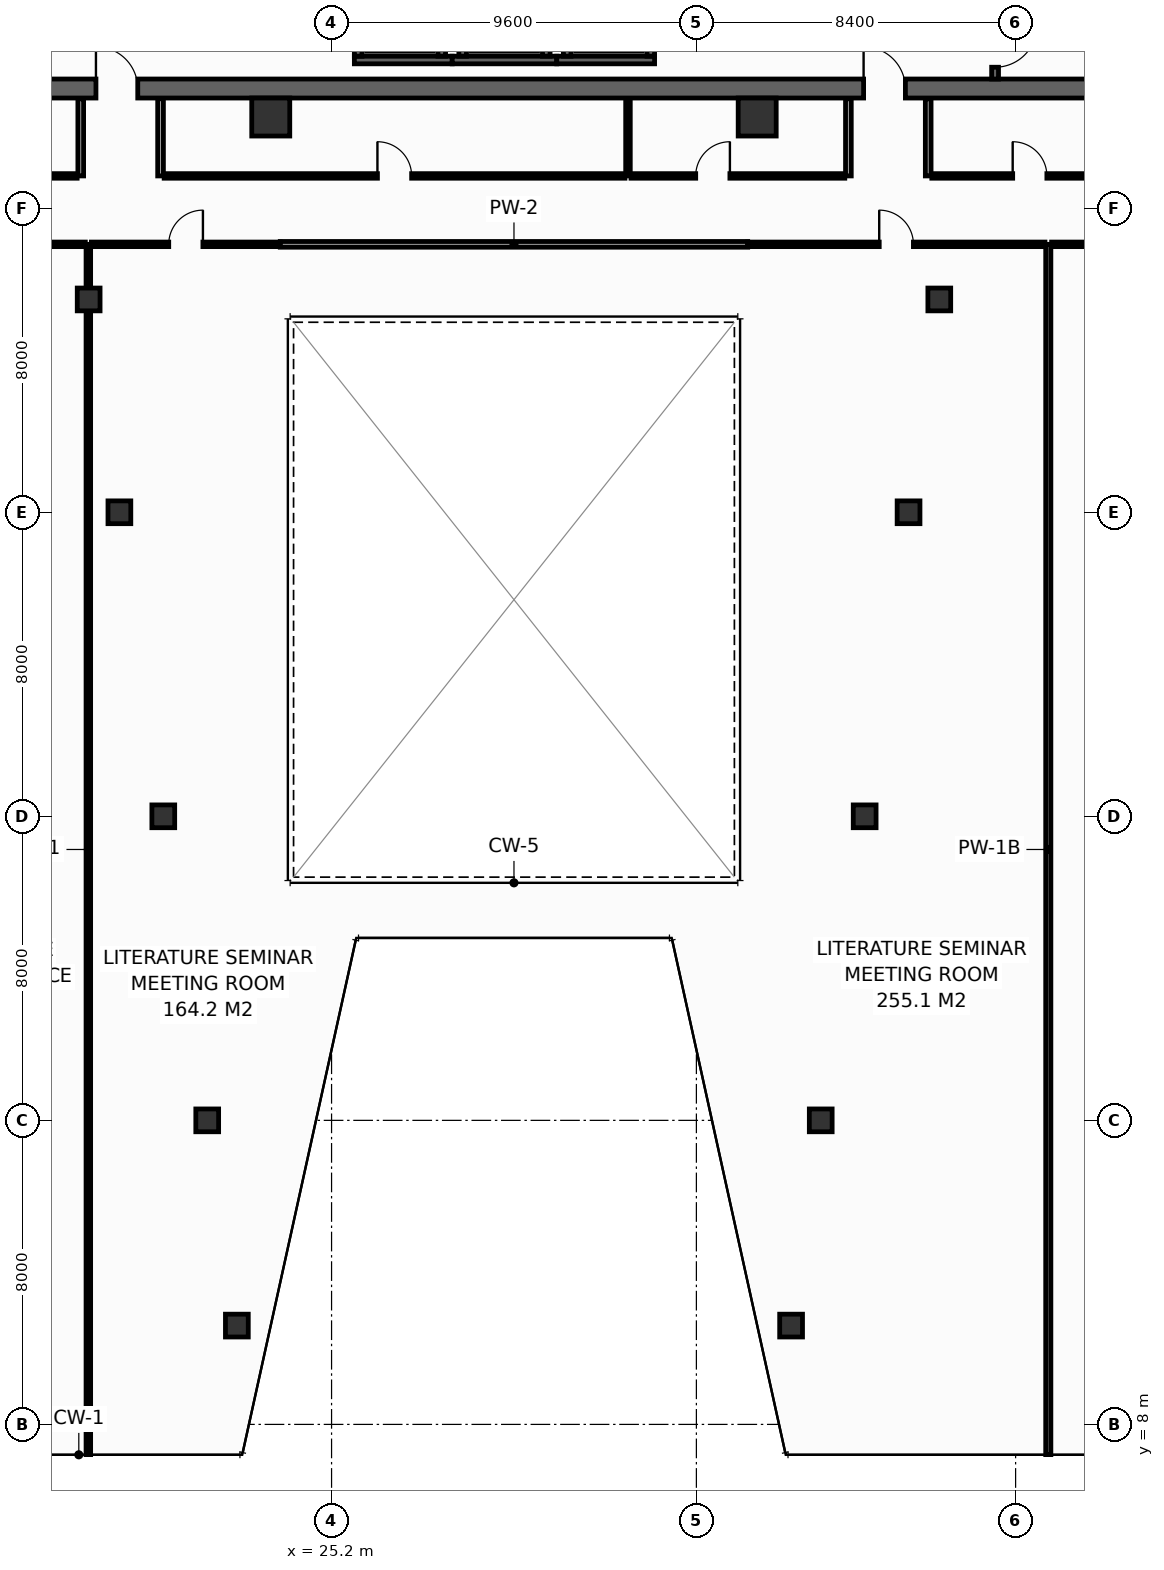
"""IFC4 building model, lengths in metres.
Left out: names, types, materials, properties, quantities, classifications, styles, units other than length and angle.
Written with IfcOpenShell. Run it as: python <this file> out.ifc"""

import sys

from ifc_helpers import new_model, si_unit, direction, frame, frame_2d, origin, origin_2d, place, context, subcontext, project, spatial, rectangle, hollow_rectangle, extrude, element, fill, save


model = new_model("IFC4")
c1 = context("Model", 3, precision=1e-05, world=origin(), true_north=direction((0.0, 1.0)))
c2 = subcontext(c1, "Body", "Model", "MODEL_VIEW")
j1 = project(units=[si_unit("LENGTHUNIT", "METRE"), si_unit("PLANEANGLEUNIT", "RADIAN")], contexts=[c1])
p1 = place(None, origin())
s1 = spatial("IfcSite", under=j1, at=p1, CompositionType="ELEMENT")
p2 = place(p1, origin())
s2 = spatial("IfcBuilding", under=s1, at=p2, CompositionType="ELEMENT")
p3 = place(p2, frame((0.0, 0.0, 160.0)))
s3 = spatial("IfcBuildingStorey", under=s2, at=p3, CompositionType="ELEMENT", Elevation=160.0)
p4 = place(p3, frame((13.6, 43.15, 0.0), z_axis=(0.0, 0.0, 1.0), x_axis=(1.0, 0.0, 0.0)))
e1 = element("IfcWall", 1, at=p4, inside=s3, PredefinedType="SHEAR", context=c2, shape_type="SweptSolid", body=[
    extrude(rectangle(XDim=32.7, YDim=0.5, at=frame_2d((16.35, 0.0))), origin(), (0.0, 0.0, 1.0), 3.55),
])
p5 = place(p4, frame((5.4, 0.0, 0.0)))
e2 = element("IfcOpeningElement", 2, at=p5, cuts=e1, PredefinedType="OPENING", context=c2, shape_type="SweptSolid", body=[
    extrude(rectangle(XDim=1.1, YDim=2.15, at=frame_2d((0.55, 1.075))), frame((0.0, 0.26, 0.0), z_axis=(0.0, -1.0, 0.0), x_axis=(1.0, 0.0, 0.0)), (0.0, 0.0, 1.0), 0.52),
])
p6 = place(p4, frame((25.6, 0.0, 0.0)))
e3 = element("IfcOpeningElement", 3, at=p6, cuts=e1, PredefinedType="OPENING", context=c2, shape_type="SweptSolid", body=[
    extrude(rectangle(XDim=1.1, YDim=2.15, at=frame_2d((0.55, 1.075))), frame((0.0, 0.26, 0.0), z_axis=(0.0, -1.0, 0.0), x_axis=(1.0, 0.0, 0.0)), (0.0, 0.0, 1.0), 0.52),
])
for number, where, z_axis, x_axis in (
    (4, (23.6, 42.4, 0.0), (0.0, 0.0, 1.0), (1.0, 0.0, 0.0)),
    (5, (36.4, 42.4, 0.0), (0.0, 0.0, 1.0), (1.0, 0.0, 0.0)),
):
    element("IfcColumn", number, at=place(p3, frame(where, z_axis=z_axis, x_axis=x_axis)), inside=s3, PredefinedType="COLUMN", context=c2, shape_type="SweptSolid", body=[
        extrude(hollow_rectangle(XDim=1.0, YDim=1.0, WallThickness=0.045, at=origin_2d()), origin(), (0.0, 0.0, 1.0), 3.8),
    ])
for number, where, z_axis, x_axis in (
    (6, (22.708, 10.6, 0.0), (0.0, 0.0, 1.0), (1.0, 0.0, 0.0)),
    (7, (37.292, 10.6, 0.0), (0.0, 0.0, 1.0), (1.0, 0.0, 0.0)),
    (8, (21.928, 16.0, 0.0), (0.0, 0.0, 1.0), (1.0, 0.0, 0.0)),
    (9, (38.072, 16.0, 0.0), (0.0, 0.0, 1.0), (1.0, 0.0, 0.0)),
    (10, (20.772, 24.0, 0.0), (0.0, 0.0, 1.0), (1.0, 0.0, 0.0)),
    (11, (39.228, 24.0, 0.0), (0.0, 0.0, 1.0), (1.0, 0.0, 0.0)),
    (12, (19.617, 32.0, 0.0), (0.0, 0.0, 1.0), (1.0, 0.0, 0.0)),
    (13, (40.383, 32.0, 0.0), (0.0, 0.0, 1.0), (1.0, 0.0, 0.0)),
    (14, (18.808, 37.6, 0.0), (0.0, 0.0, 1.0), (1.0, 0.0, 0.0)),
    (15, (41.192, 37.6, 0.0), (0.0, 0.0, 1.0), (1.0, 0.0, 0.0)),
):
    element("IfcColumn", number, at=place(p3, frame(where, z_axis=z_axis, x_axis=x_axis)), inside=s3, PredefinedType="COLUMN", context=c2, shape_type="SweptSolid", body=[
        extrude(hollow_rectangle(XDim=0.6, YDim=0.6, WallThickness=0.028, at=origin_2d()), origin(), (0.0, 0.0, 1.0), 3.8),
    ])
p7 = place(p3, frame((25.8, 43.9, 0.0), z_axis=(0.0, 0.0, 1.0), x_axis=(1.0, 0.0, 0.0)))
e16 = element("IfcWall", 16, at=p7, inside=s3, PredefinedType="SHEAR", context=c2, shape_type="SweptSolid", body=[
    extrude(rectangle(XDim=2.575, YDim=0.2, at=frame_2d((1.288, 0.0))), origin(), (0.0, 0.0, 1.0), 3.55),
])
for number, where, z_axis, x_axis in (
    (17, (25.9, 44.0, 0.0), (0.0, 0.0, 1.0), (0.0, 1.0, 0.0)),
    (18, (28.1, 44.0, 0.0), (0.0, 0.0, 1.0), (0.0, 1.0, 0.0)),
):
    element("IfcWall", number, at=place(p3, frame(where, z_axis=z_axis, x_axis=x_axis)), inside=s3, PredefinedType="SHEAR", context=c2, shape_type="SweptSolid", body=[
        extrude(rectangle(XDim=2.3, YDim=0.2, at=frame_2d((1.15, 0.0))), origin(), (0.0, 0.0, 1.0), 3.55),
    ])
p8 = place(p3, frame((28.375, 43.9, 0.0), z_axis=(0.0, 0.0, 1.0), x_axis=(1.0, 0.0, 0.0)))
e19 = element("IfcWall", 19, at=p8, inside=s3, PredefinedType="SHEAR", context=c2, shape_type="SweptSolid", body=[
    extrude(rectangle(XDim=2.75, YDim=0.2, at=frame_2d((1.375, 0.0))), origin(), (0.0, 0.0, 1.0), 3.55),
])
for number, where, z_axis, x_axis in (
    (20, (28.65, 44.0, 0.0), (0.0, 0.0, 1.0), (0.0, 1.0, 0.0)),
    (21, (30.85, 44.0, 0.0), (0.0, 0.0, 1.0), (0.0, 1.0, 0.0)),
):
    element("IfcWall", number, at=place(p3, frame(where, z_axis=z_axis, x_axis=x_axis)), inside=s3, PredefinedType="SHEAR", context=c2, shape_type="SweptSolid", body=[
        extrude(rectangle(XDim=2.3, YDim=0.2, at=frame_2d((1.15, 0.0))), origin(), (0.0, 0.0, 1.0), 3.55),
    ])
p9 = place(p3, frame((31.125, 43.9, 0.0), z_axis=(0.0, 0.0, 1.0), x_axis=(1.0, 0.0, 0.0)))
e22 = element("IfcWall", 22, at=p9, inside=s3, PredefinedType="SHEAR", context=c2, shape_type="SweptSolid", body=[
    extrude(rectangle(XDim=2.575, YDim=0.2, at=frame_2d((1.288, 0.0))), origin(), (0.0, 0.0, 1.0), 3.55),
])
for number, where, z_axis, x_axis in (
    (23, (31.4, 44.0, 0.0), (0.0, 0.0, 1.0), (0.0, 1.0, 0.0)),
    (24, (33.6, 44.0, 0.0), (0.0, 0.0, 1.0), (0.0, 1.0, 0.0)),
):
    element("IfcWall", number, at=place(p3, frame(where, z_axis=z_axis, x_axis=x_axis)), inside=s3, PredefinedType="SHEAR", context=c2, shape_type="SweptSolid", body=[
        extrude(rectangle(XDim=2.3, YDim=0.2, at=frame_2d((1.15, 0.0))), origin(), (0.0, 0.0, 1.0), 3.55),
    ])
p10 = place(p3, frame((42.66, 53.8, 0.0), z_axis=(0.0, 0.0, 1.0), x_axis=(0.0, -1.0, 0.0)))
e25 = element("IfcWall", 25, at=p10, inside=s3, PredefinedType="SHEAR", context=c2, shape_type="SweptSolid", body=[
    extrude(rectangle(XDim=10.4, YDim=0.18, at=frame_2d((5.2, 0.0))), origin(), (0.0, 0.0, 1.0), 3.55),
])
p11 = place(p10, frame((8.99, 0.0, 0.0)))
e26 = element("IfcOpeningElement", 26, at=p11, cuts=e25, PredefinedType="OPENING", context=c2, shape_type="SweptSolid", body=[
    extrude(rectangle(XDim=1.1, YDim=2.15, at=frame_2d((0.55, 1.075))), frame((0.0, 0.1, 0.0), z_axis=(0.0, -1.0, 0.0), x_axis=(1.0, 0.0, 0.0)), (0.0, 0.0, 1.0), 0.2),
])
for number, where, z_axis, x_axis in (
    (27, (18.6, 40.85, 0.0), (0.0, 0.0, 1.0), (0.0, 1.0, 0.0)),
    (28, (20.7, 40.85, 0.0), (0.0, 0.0, 1.0), (0.0, 1.0, 0.0)),
    (29, (38.8, 40.85, 0.0), (0.0, 0.0, 1.0), (0.0, 1.0, 0.0)),
    (30, (40.9, 40.85, 0.0), (0.0, 0.0, 1.0), (0.0, 1.0, 0.0)),
):
    element("IfcWall", number, at=place(p3, frame(where, z_axis=z_axis, x_axis=x_axis)), inside=s3, PredefinedType="PARTITIONING", context=c2, shape_type="SweptSolid", body=[
        extrude(rectangle(XDim=2.03, YDim=0.15, at=frame_2d((1.015, 0.0))), origin(), (0.0, 0.0, 1.0), 3.55),
    ])
p12 = place(p3, frame((13.85, 40.85, 0.0), z_axis=(0.0, 0.0, 1.0), x_axis=(1.0, 0.0, 0.0)))
e31 = element("IfcWall", 31, at=p12, inside=s3, PredefinedType="PARTITIONING", context=c2, shape_type="SweptSolid", body=[
    extrude(rectangle(XDim=4.655, YDim=0.12, at=frame_2d((2.327, 0.0))), origin(), (0.0, 0.0, 1.0), 3.55),
])
p13 = place(p12, frame((1.877, 0.0, 0.0)))
e32 = element("IfcOpeningElement", 32, at=p13, cuts=e31, PredefinedType="OPENING", context=c2, shape_type="SweptSolid", body=[
    extrude(rectangle(XDim=0.9, YDim=2.1, at=frame_2d((0.45, 1.05))), frame((0.0, 0.07, 0.0), z_axis=(0.0, -1.0, 0.0), x_axis=(1.0, 0.0, 0.0)), (0.0, 0.0, 1.0), 0.14),
])
p14 = place(p3, frame((33.0, 40.85, 0.0), z_axis=(0.0, 0.0, 1.0), x_axis=(0.0, 1.0, 0.0)))
e33 = element("IfcWall", 33, at=p14, inside=s3, PredefinedType="PARTITIONING", context=c2, shape_type="SweptSolid", body=[
    extrude(rectangle(XDim=2.03, YDim=0.12, at=frame_2d((1.015, 0.0))), origin(), (0.0, 0.0, 1.0), 2.835),
])
p15 = place(p3, frame((20.795, 40.85, 0.0), z_axis=(0.0, 0.0, 1.0), x_axis=(1.0, 0.0, 0.0)))
e34 = element("IfcWall", 34, at=p15, inside=s3, PredefinedType="PARTITIONING", context=c2, shape_type="SweptSolid", body=[
    extrude(rectangle(XDim=12.125, YDim=0.12, at=frame_2d((6.062, 0.0))), origin(), (0.0, 0.0, 1.0), 2.835),
])
p16 = place(p15, frame((5.612, 0.0, 0.0)))
e35 = element("IfcOpeningElement", 35, at=p16, cuts=e34, PredefinedType="OPENING", context=c2, shape_type="SweptSolid", body=[
    extrude(rectangle(XDim=0.9, YDim=2.1, at=frame_2d((0.45, 1.05))), frame((0.0, 0.07, 0.0), z_axis=(0.0, -1.0, 0.0), x_axis=(1.0, 0.0, 0.0)), (0.0, 0.0, 1.0), 0.14),
])
p17 = place(p3, frame((33.08, 40.85, 0.0), z_axis=(0.0, 0.0, 1.0), x_axis=(1.0, 0.0, 0.0)))
e36 = element("IfcWall", 36, at=p17, inside=s3, PredefinedType="PARTITIONING", context=c2, shape_type="SweptSolid", body=[
    extrude(rectangle(XDim=5.625, YDim=0.12, at=frame_2d((2.812, 0.0))), origin(), (0.0, 0.0, 1.0), 2.835),
])
p18 = place(p17, frame((1.702, 0.0, 0.0)))
e37 = element("IfcOpeningElement", 37, at=p18, cuts=e36, PredefinedType="OPENING", context=c2, shape_type="SweptSolid", body=[
    extrude(rectangle(XDim=0.9, YDim=2.1, at=frame_2d((0.45, 1.05))), frame((0.0, 0.07, 0.0), z_axis=(0.0, -1.0, 0.0), x_axis=(1.0, 0.0, 0.0)), (0.0, 0.0, 1.0), 0.14),
])
p19 = place(p3, frame((40.995, 40.85, 0.0), z_axis=(0.0, 0.0, 1.0), x_axis=(1.0, 0.0, 0.0)))
e38 = element("IfcWall", 38, at=p19, inside=s3, PredefinedType="PARTITIONING", context=c2, shape_type="SweptSolid", body=[
    extrude(rectangle(XDim=5.155, YDim=0.12, at=frame_2d((2.577, 0.0))), origin(), (0.0, 0.0, 1.0), 3.55),
])
p20 = place(p19, frame((2.128, 0.0, 0.0)))
e39 = element("IfcOpeningElement", 39, at=p20, cuts=e38, PredefinedType="OPENING", context=c2, shape_type="SweptSolid", body=[
    extrude(rectangle(XDim=0.9, YDim=2.1, at=frame_2d((0.45, 1.05))), frame((0.0, 0.07, 0.0), z_axis=(0.0, -1.0, 0.0), x_axis=(1.0, 0.0, 0.0)), (0.0, 0.0, 1.0), 0.14),
])
p21 = place(p3, frame((18.8, 7.205, 0.0), z_axis=(0.0, 0.0, 1.0), x_axis=(0.0, 1.0, 0.0)))
e40 = element("IfcWall", 40, at=p21, inside=s3, PredefinedType="PARTITIONING", context=c2, shape_type="SweptSolid", body=[
    extrude(rectangle(XDim=31.845, YDim=0.12, at=frame_2d((15.922, 0.0))), origin(), (0.0, 0.0, 1.0), 2.835),
])
p22 = place(p3, frame((44.06, 7.205, 0.0), z_axis=(0.0, 0.0, 1.0), x_axis=(0.0, 1.0, 0.0)))
e41 = element("IfcWall", 41, at=p22, inside=s3, PredefinedType="PARTITIONING", context=c2, shape_type="SweptSolid", body=[
    extrude(rectangle(XDim=31.845, YDim=0.135, at=frame_2d((15.922, 0.0))), origin(), (0.0, 0.0, 1.0), 2.835),
])
p23 = place(p3, frame((13.15, 39.05, 0.0), z_axis=(0.0, 0.0, 1.0), x_axis=(1.0, 0.0, 0.0)))
e42 = element("IfcWall", 42, at=p23, inside=s3, PredefinedType="PARTITIONING", context=c2, shape_type="SweptSolid", body=[
    extrude(rectangle(XDim=5.57, YDim=0.12, at=frame_2d((2.785, 0.0))), origin(), (0.0, 0.0, 1.0), 3.55),
])
p24 = place(p23, frame((2.335, 0.0, 0.0)))
e43 = element("IfcOpeningElement", 43, at=p24, cuts=e42, PredefinedType="OPENING", context=c2, shape_type="SweptSolid", body=[
    extrude(rectangle(XDim=0.9, YDim=2.1, at=frame_2d((0.45, 1.05))), frame((0.0, 0.07, 0.0), z_axis=(0.0, -1.0, 0.0), x_axis=(1.0, 0.0, 0.0)), (0.0, 0.0, 1.0), 0.14),
])
p25 = place(p3, frame((18.88, 39.05, 0.0), z_axis=(0.0, 0.0, 1.0), x_axis=(1.0, 0.0, 0.0)))
e44 = element("IfcWall", 44, at=p25, inside=s3, PredefinedType="PARTITIONING", context=c2, shape_type="SweptSolid", body=[
    extrude(rectangle(XDim=4.97, YDim=0.12, at=frame_2d((2.485, 0.0))), origin(), (0.0, 0.0, 1.0), 2.835),
])
p26 = place(p25, frame((2.035, 0.0, 0.0)))
e45 = element("IfcOpeningElement", 45, at=p26, cuts=e44, PredefinedType="OPENING", context=c2, shape_type="SweptSolid", body=[
    extrude(rectangle(XDim=0.9, YDim=2.1, at=frame_2d((0.45, 1.05))), frame((0.0, 0.07, 0.0), z_axis=(0.0, -1.0, 0.0), x_axis=(1.0, 0.0, 0.0)), (0.0, 0.0, 1.0), 0.14),
])
p27 = place(p3, frame((23.85, 39.05, 0.0), z_axis=(0.0, 0.0, 1.0), x_axis=(1.0, 0.0, 0.0)))
e46 = element("IfcWall", 46, at=p27, inside=s3, PredefinedType="PARTITIONING", context=c2, shape_type="SweptSolid", body=[
    extrude(rectangle(XDim=12.3, YDim=0.15, at=frame_2d((6.15, 0.0))), origin(), (0.0, 0.0, 1.0), 3.55),
])
p28 = place(p3, frame((36.15, 39.05, 0.0), z_axis=(0.0, 0.0, 1.0), x_axis=(1.0, 0.0, 0.0)))
e47 = element("IfcWall", 47, at=p28, inside=s3, PredefinedType="PARTITIONING", context=c2, shape_type="SweptSolid", body=[
    extrude(rectangle(XDim=7.823, YDim=0.12, at=frame_2d((3.911, 0.0))), origin(), (0.0, 0.0, 1.0), 2.835),
])
p29 = place(p28, frame((3.461, 0.0, 0.0)))
e48 = element("IfcOpeningElement", 48, at=p29, cuts=e47, PredefinedType="OPENING", context=c2, shape_type="SweptSolid", body=[
    extrude(rectangle(XDim=0.9, YDim=2.1, at=frame_2d((0.45, 1.05))), frame((0.0, 0.07, 0.0), z_axis=(0.0, -1.0, 0.0), x_axis=(1.0, 0.0, 0.0)), (0.0, 0.0, 1.0), 0.14),
])
p30 = place(p3, frame((44.147, 39.05, 0.0), z_axis=(0.0, 0.0, 1.0), x_axis=(1.0, 0.0, 0.0)))
e49 = element("IfcWall", 49, at=p30, inside=s3, PredefinedType="PARTITIONING", context=c2, shape_type="SweptSolid", body=[
    extrude(rectangle(XDim=9.504, YDim=0.12, at=frame_2d((4.752, 0.0))), origin(), (0.0, 0.0, 1.0), 3.035),
])
p31 = place(p30, frame((4.302, 0.0, 0.0)))
e50 = element("IfcOpeningElement", 50, at=p31, cuts=e49, PredefinedType="OPENING", context=c2, shape_type="SweptSolid", body=[
    extrude(rectangle(XDim=0.9, YDim=2.1, at=frame_2d((0.45, 1.05))), frame((0.0, 0.07, 0.0), z_axis=(0.0, -1.0, 0.0), x_axis=(1.0, 0.0, 0.0)), (0.0, 0.0, 1.0), 0.14),
])
p32 = place(p11, origin())
e51 = element("IfcDoor", 51, at=p32, inside=s3, OperationType="SINGLE_SWING_LEFT", PredefinedType="DOOR", context=c2, shape_type="SweptSolid", body=[
    extrude(rectangle(XDim=1.1, YDim=2.15, at=frame_2d((0.55, 1.075))), frame((0.0, 0.025, 0.0), z_axis=(0.0, -1.0, 0.0), x_axis=(1.0, 0.0, 0.0)), (0.0, 0.0, 1.0), 0.05),
])
fill(e26, e51)
p33 = place(p5, origin())
e52 = element("IfcDoor", 52, at=p33, inside=s3, OperationType="SINGLE_SWING_LEFT", PredefinedType="DOOR", context=c2, shape_type="SweptSolid", body=[
    extrude(rectangle(XDim=1.1, YDim=2.15, at=frame_2d((0.55, 1.075))), frame((0.0, 0.025, 0.0), z_axis=(0.0, -1.0, 0.0), x_axis=(1.0, 0.0, 0.0)), (0.0, 0.0, 1.0), 0.05),
])
fill(e2, e52)
p34 = place(p6, origin())
e53 = element("IfcDoor", 53, at=p34, inside=s3, OperationType="SINGLE_SWING_LEFT", PredefinedType="DOOR", context=c2, shape_type="SweptSolid", body=[
    extrude(rectangle(XDim=1.1, YDim=2.15, at=frame_2d((0.55, 1.075))), frame((0.0, 0.025, 0.0), z_axis=(0.0, -1.0, 0.0), x_axis=(1.0, 0.0, 0.0)), (0.0, 0.0, 1.0), 0.05),
])
fill(e3, e53)
p35 = place(p16, origin())
e54 = element("IfcDoor", 54, at=p35, inside=s3, OperationType="SINGLE_SWING_LEFT", PredefinedType="DOOR", context=c2, shape_type="SweptSolid", body=[
    extrude(rectangle(XDim=0.9, YDim=2.1, at=frame_2d((0.45, 1.05))), frame((0.0, 0.025, 0.0), z_axis=(0.0, -1.0, 0.0), x_axis=(1.0, 0.0, 0.0)), (0.0, 0.0, 1.0), 0.05),
])
fill(e35, e54)
p36 = place(p18, origin())
e55 = element("IfcDoor", 55, at=p36, inside=s3, OperationType="SINGLE_SWING_RIGHT", PredefinedType="DOOR", context=c2, shape_type="SweptSolid", body=[
    extrude(rectangle(XDim=0.9, YDim=2.1, at=frame_2d((0.45, 1.05))), frame((0.0, 0.025, 0.0), z_axis=(0.0, -1.0, 0.0), x_axis=(1.0, 0.0, 0.0)), (0.0, 0.0, 1.0), 0.05),
])
fill(e37, e55)
p37 = place(p20, origin())
e56 = element("IfcDoor", 56, at=p37, inside=s3, OperationType="SINGLE_SWING_LEFT", PredefinedType="DOOR", context=c2, shape_type="SweptSolid", body=[
    extrude(rectangle(XDim=0.9, YDim=2.1, at=frame_2d((0.45, 1.05))), frame((0.0, 0.025, 0.0), z_axis=(0.0, -1.0, 0.0), x_axis=(1.0, 0.0, 0.0)), (0.0, 0.0, 1.0), 0.05),
])
fill(e39, e56)
p38 = place(p26, origin())
e57 = element("IfcDoor", 57, at=p38, inside=s3, OperationType="SINGLE_SWING_RIGHT", PredefinedType="DOOR", context=c2, shape_type="SweptSolid", body=[
    extrude(rectangle(XDim=0.9, YDim=2.1, at=frame_2d((0.45, 1.05))), frame((0.0, 0.025, 0.0), z_axis=(0.0, -1.0, 0.0), x_axis=(1.0, 0.0, 0.0)), (0.0, 0.0, 1.0), 0.05),
])
fill(e45, e57)
p39 = place(p29, origin())
e58 = element("IfcDoor", 58, at=p39, inside=s3, OperationType="SINGLE_SWING_LEFT", PredefinedType="DOOR", context=c2, shape_type="SweptSolid", body=[
    extrude(rectangle(XDim=0.9, YDim=2.1, at=frame_2d((0.45, 1.05))), frame((0.0, 0.025, 0.0), z_axis=(0.0, -1.0, 0.0), x_axis=(1.0, 0.0, 0.0)), (0.0, 0.0, 1.0), 0.05),
])
fill(e48, e58)
save(model, sys.argv[1])
